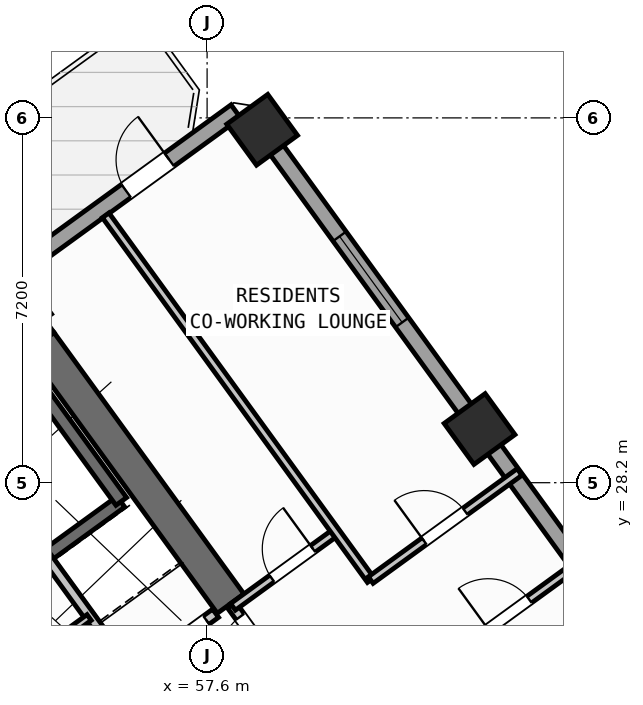
"""IFC4 building model, lengths in metres.
Left out: names, types, materials, properties, quantities, classifications, styles, units other than length and angle.
Written with IfcOpenShell. Run it as: python <this file> out.ifc"""

import sys

from ifc_helpers import new_model, si_unit, direction, frame, frame_2d, origin, origin_2d, place, context, subcontext, project, spatial, rectangle, hollow_rectangle, extrude, source, transform, mapped, element, fill, save


model = new_model("IFC4")
c1 = context("Model", 3, precision=1e-05, world=origin(), true_north=direction((0.0, 1.0)))
c2 = subcontext(c1, "Body", "Model", "MODEL_VIEW")
j1 = project(units=[si_unit("LENGTHUNIT", "METRE"), si_unit("PLANEANGLEUNIT", "RADIAN")], contexts=[c1])
p1 = place(None, origin())
s1 = spatial("IfcSite", under=j1, at=p1, CompositionType="ELEMENT")
p2 = place(p1, origin())
s2 = spatial("IfcBuilding", under=s1, at=p2, CompositionType="ELEMENT")
p3 = place(p2, frame((0.0, 0.0, 27.6)))
s3 = spatial("IfcBuildingStorey", under=s2, at=p3, CompositionType="ELEMENT", Elevation=27.6)
p4 = place(p3, frame((44.325, 24.113, 0.0), z_axis=(0.0, 0.0, 1.0), x_axis=(0.809012664862, 0.58779121131, 0.0)))
e1 = element("IfcWall", 1, at=p4, inside=s3, PredefinedType="SHEAR", context=c2, shape_type="SweptSolid", body=[
    extrude(rectangle(XDim=12.44, YDim=0.65, at=frame_2d((6.22, 0.0))), origin(), (0.0, 0.0, 1.0), 3.35),
])
p5 = place(p3, frame((58.064, 25.813, 0.0), z_axis=(0.0, 0.0, 1.0), x_axis=(-0.58777996584, 0.809020835181, 0.0)))
e2 = element("IfcWall", 2, at=p5, inside=s3, PredefinedType="SHEAR", context=c2, shape_type="SweptSolid", body=[
    extrude(rectangle(XDim=6.375, YDim=0.65, at=frame_2d((3.188, 0.0))), origin(), (0.0, 0.0, 1.0), 3.35),
])
m1 = source(origin(), c2, "Body", "SweptSolid", [
    extrude(hollow_rectangle(XDim=1.0, YDim=1.0, WallThickness=0.04, at=origin_2d()), origin(), (0.0, 0.0, 1.0), 3.6),
])
for number, where, z_axis, x_axis in (
    (3, (62.977, 29.259, 0.0), (0.0, 0.0, 1.0), (0.809, 0.588, 0.0)),
    (4, (58.686, 35.165, 0.0), (0.0, 0.0, 1.0), (0.809, 0.588, 0.0)),
):
    element("IfcColumn", number, at=place(p3, frame(where, z_axis=z_axis, x_axis=x_axis)), inside=s3, PredefinedType="COLUMN", context=c2, shape_type="MappedRepresentation", body=[
        mapped(m1, transform((0.0, 0.0, 0.0), scale=1.0)),
    ])
p6 = place(p3, frame((43.938, 25.192, 0.0), z_axis=(0.0, 0.0, 1.0), x_axis=(0.809016324578, 0.587786174187, 0.0)))
e5 = element("IfcWall", 5, at=p6, inside=s3, PredefinedType="STANDARD", context=c2, shape_type="SweptSolid", body=[
    extrude(rectangle(XDim=17.587, YDim=0.32, at=frame_2d((8.794, 0.0))), origin(), (0.0, 0.0, 1.0), 3.35),
])
p7 = place(p6, frame((14.914, 0.0, 0.0)))
e6 = element("IfcOpeningElement", 6, at=p7, cuts=e5, PredefinedType="OPENING", context=c2, shape_type="SweptSolid", body=[
    extrude(rectangle(XDim=1.05, YDim=2.15, at=frame_2d((0.525, 1.075))), frame((0.0, 0.17, 0.0), z_axis=(0.0, -1.0, 0.0), x_axis=(1.0, 0.0, 0.0)), (0.0, 0.0, 1.0), 0.34),
])
p8 = place(p6, frame((2.169, 0.0, 0.8)))
e7 = element("IfcOpeningElement", 7, at=p8, cuts=e5, PredefinedType="OPENING", context=c2, shape_type="SweptSolid", body=[
    extrude(rectangle(XDim=2.1, YDim=1.55, at=frame_2d((1.05, 0.775))), frame((0.0, 0.17, 0.0), z_axis=(0.0, -1.0, 0.0), x_axis=(1.0, 0.0, 0.0)), (0.0, 0.0, 1.0), 0.34),
])
p9 = place(p6, frame((7.319, 0.0, 0.8)))
e8 = element("IfcOpeningElement", 8, at=p9, cuts=e5, PredefinedType="OPENING", context=c2, shape_type="SweptSolid", body=[
    extrude(rectangle(XDim=2.1, YDim=1.55, at=frame_2d((1.05, 0.775))), frame((0.0, 0.17, 0.0), z_axis=(0.0, -1.0, 0.0), x_axis=(1.0, 0.0, 0.0)), (0.0, 0.0, 1.0), 0.34),
])
p10 = place(p3, frame((58.455, 35.484, 0.0), z_axis=(0.0, 0.0, 1.0), x_axis=(0.587783625747, -0.809018176127, 0.0)))
e9 = element("IfcWall", 9, at=p10, inside=s3, PredefinedType="STANDARD", context=c2, shape_type="SweptSolid", body=[
    extrude(rectangle(XDim=21.587, YDim=0.32, at=frame_2d((10.794, 0.0))), origin(), (0.0, 0.0, 1.0), 2.725),
])
p11 = place(p10, frame((2.994, 0.0, 0.8)))
e10 = element("IfcOpeningElement", 10, at=p11, cuts=e9, PredefinedType="OPENING", context=c2, shape_type="SweptSolid", body=[
    extrude(rectangle(XDim=2.1, YDim=1.55, at=frame_2d((1.05, 0.775))), frame((0.0, 0.17, 0.0), z_axis=(0.0, -1.0, 0.0), x_axis=(1.0, 0.0, 0.0)), (0.0, 0.0, 1.0), 0.34),
])
p12 = place(p10, frame((11.934, 0.0, 0.85)))
e11 = element("IfcOpeningElement", 11, at=p12, cuts=e9, PredefinedType="OPENING", context=c2, shape_type="SweptSolid", body=[
    extrude(rectangle(XDim=1.8, YDim=1.5, at=frame_2d((0.9, 0.75))), frame((0.0, 0.17, 0.0), z_axis=(0.0, -1.0, 0.0), x_axis=(1.0, 0.0, 0.0)), (0.0, 0.0, 1.0), 0.34),
])
p13 = place(p10, frame((18.535, 0.0, 0.85)))
e12 = element("IfcOpeningElement", 12, at=p13, cuts=e9, PredefinedType="OPENING", context=c2, shape_type="SweptSolid", body=[
    extrude(rectangle(XDim=1.5, YDim=1.5, at=frame_2d((0.75, 0.75))), frame((0.0, 0.17, 0.0), z_axis=(0.0, -1.0, 0.0), x_axis=(1.0, 0.0, 0.0)), (0.0, 0.0, 1.0), 0.34),
])
p14 = place(p3, frame((49.863, 23.44, 0.0), z_axis=(0.0, 0.0, 1.0), x_axis=(0.809003474932, 0.587803859759, 0.0)))
e13 = element("IfcWall", 13, at=p14, inside=s3, PredefinedType="SHEAR", context=c2, shape_type="SweptSolid", body=[
    extrude(rectangle(XDim=7.46, YDim=0.26, at=frame_2d((3.73, 0.0))), origin(), (0.0, 0.0, 1.0), 3.35),
])
p15 = place(p14, frame((0.36, 0.0, 0.0)))
e14 = element("IfcOpeningElement", 14, at=p15, cuts=e13, PredefinedType="OPENING", context=c2, shape_type="SweptSolid", body=[
    extrude(rectangle(XDim=0.86, YDim=2.05, at=frame_2d((0.43, 1.025))), frame((0.0, 0.14, 0.0), z_axis=(0.0, -1.0, 0.0), x_axis=(1.0, 0.0, 0.0)), (0.0, 0.0, 1.0), 0.28),
])
p16 = place(p3, frame((55.906, 27.831, 0.0), z_axis=(0.0, 0.0, 1.0), x_axis=(-0.587804123638, 0.809003283204, 0.0)))
e15 = element("IfcWall", 15, at=p16, inside=s3, PredefinedType="SHEAR", context=c2, shape_type="SweptSolid", body=[
    extrude(rectangle(XDim=3.16, YDim=0.26, at=frame_2d((1.58, 0.0))), origin(), (0.0, 0.0, 1.0), 3.35),
])
p17 = place(p3, frame((56.111, 24.419, 0.0), z_axis=(0.0, 0.0, 1.0), x_axis=(-0.58777848983, 0.809021907548, 0.0)))
e16 = element("IfcWall", 16, at=p17, inside=s3, PredefinedType="STANDARD", context=c2, shape_type="SweptSolid", body=[
    extrude(rectangle(XDim=2.88, YDim=0.2, at=frame_2d((1.44, 0.0))), origin(), (0.0, 0.0, 1.0), 3.34),
])
p18 = place(p3, frame((53.425, 22.468, 0.0), z_axis=(0.0, 0.0, 1.0), x_axis=(0.80902705128, 0.587771409902, 0.0)))
e17 = element("IfcWall", 17, at=p18, inside=s3, PredefinedType="STANDARD", context=c2, shape_type="SweptSolid", body=[
    extrude(rectangle(XDim=5.368, YDim=0.2, at=frame_2d((2.684, 0.0))), origin(), (0.0, 0.0, 1.0), 3.34),
])
p19 = place(p18, frame((4.28, 0.0, 0.0)))
e18 = element("IfcOpeningElement", 18, at=p19, cuts=e17, PredefinedType="OPENING", context=c2, shape_type="SweptSolid", body=[
    extrude(rectangle(XDim=0.86, YDim=2.05, at=frame_2d((0.43, 1.025))), frame((0.0, 0.11, 0.0), z_axis=(0.0, -1.0, 0.0), x_axis=(1.0, 0.0, 0.0)), (0.0, 0.0, 1.0), 0.22),
])
p20 = place(p18, frame((1.45, 0.0, 0.0)))
e19 = element("IfcOpeningElement", 19, at=p20, cuts=e17, PredefinedType="OPENING", context=c2, shape_type="SweptSolid", body=[
    extrude(rectangle(XDim=0.86, YDim=2.05, at=frame_2d((0.43, 1.025))), frame((0.0, 0.11, 0.0), z_axis=(0.0, -1.0, 0.0), x_axis=(1.0, 0.0, 0.0)), (0.0, 0.0, 1.0), 0.22),
])
p21 = place(p3, frame((52.618, 23.612, 0.0), z_axis=(0.0, 0.0, 1.0), x_axis=(0.809009587469, 0.587795446889, 0.0)))
e20 = element("IfcWall", 20, at=p21, inside=s3, PredefinedType="PLUMBINGWALL", context=c2, shape_type="SweptSolid", body=[
    extrude(rectangle(XDim=3.28, YDim=0.14, at=frame_2d((1.64, 0.0))), origin(), (0.0, 0.0, 1.0), 3.34),
])
p22 = place(p21, frame((1.2, 0.0, 0.0)))
e21 = element("IfcOpeningElement", 21, at=p22, cuts=e20, PredefinedType="OPENING", context=c2, shape_type="SweptSolid", body=[
    extrude(rectangle(XDim=0.78, YDim=2.05, at=frame_2d((0.39, 1.025))), frame((0.0, 0.08, 0.0), z_axis=(0.0, -1.0, 0.0), x_axis=(1.0, 0.0, 0.0)), (0.0, 0.0, 1.0), 0.16),
])
p23 = place(p3, frame((59.827, 23.386, 0.0), z_axis=(0.0, 0.0, 1.0), x_axis=(-0.587803840107, 0.809003489211, 0.0)))
e22 = element("IfcWall", 22, at=p23, inside=s3, PredefinedType="STANDARD", context=c2, shape_type="SweptSolid", body=[
    extrude(rectangle(XDim=2.96, YDim=0.2, at=frame_2d((1.48, 0.0))), origin(), (0.0, 0.0, 1.0), 3.34),
])
p24 = place(p23, frame((1.68, 0.0, 0.0)))
e23 = element("IfcOpeningElement", 23, at=p24, cuts=e22, PredefinedType="OPENING", context=c2, shape_type="SweptSolid", body=[
    extrude(rectangle(XDim=1.0, YDim=2.1, at=frame_2d((0.5, 1.05))), frame((0.0, 0.11, 0.0), z_axis=(0.0, -1.0, 0.0), x_axis=(1.0, 0.0, 0.0)), (0.0, 0.0, 1.0), 0.22),
])
p25 = place(p3, frame((58.111, 25.749, 0.0), z_axis=(0.0, 0.0, 1.0), x_axis=(0.809000999347, 0.58780726693, 0.0)))
e24 = element("IfcWall", 24, at=p25, inside=s3, PredefinedType="PARTITIONING", context=c2, shape_type="SweptSolid", body=[
    extrude(rectangle(XDim=2.51, YDim=0.16, at=frame_2d((1.255, 0.0))), origin(), (0.0, 0.0, 1.0), 2.725),
])
p26 = place(p25, frame((0.95, 0.0, 0.0)))
e25 = element("IfcOpeningElement", 25, at=p26, cuts=e24, PredefinedType="OPENING", context=c2, shape_type="SweptSolid", body=[
    extrude(rectangle(XDim=1.0, YDim=2.1, at=frame_2d((0.5, 1.05))), frame((0.0, 0.09, 0.0), z_axis=(0.0, -1.0, 0.0), x_axis=(1.0, 0.0, 0.0)), (0.0, 0.0, 1.0), 0.18),
])
p27 = place(p3, frame((60.829, 26.278, 0.0), z_axis=(0.0, 0.0, 1.0), x_axis=(-0.587781800813, 0.80901950201, 0.0)))
e26 = element("IfcWall", 26, at=p27, inside=s3, PredefinedType="PARTITIONING", context=c2, shape_type="SweptSolid", body=[
    extrude(rectangle(XDim=8.9, YDim=0.16, at=frame_2d((4.45, 0.0))), origin(), (0.0, 0.0, 1.0), 3.34),
])
p28 = place(p3, frame((62.093, 24.538, 0.0), z_axis=(0.0, 0.0, 1.0), x_axis=(0.809035546126, 0.58775971715, 0.0)))
e27 = element("IfcWall", 27, at=p28, inside=s3, PredefinedType="PARTITIONING", context=c2, shape_type="SweptSolid", body=[
    extrude(rectangle(XDim=3.63, YDim=0.16, at=frame_2d((1.815, 0.0))), origin(), (0.0, 0.0, 1.0), 3.34),
])
p29 = place(p28, frame((1.305, 0.0, 0.0)))
e28 = element("IfcOpeningElement", 28, at=p29, cuts=e27, PredefinedType="OPENING", context=c2, shape_type="SweptSolid", body=[
    extrude(rectangle(XDim=1.0, YDim=2.1, at=frame_2d((0.5, 1.05))), frame((0.0, 0.09, 0.0), z_axis=(0.0, -1.0, 0.0), x_axis=(1.0, 0.0, 0.0)), (0.0, 0.0, 1.0), 0.18),
])
p30 = place(p3, frame((60.829, 26.278, 0.0), z_axis=(0.0, 0.0, 1.0), x_axis=(0.809003564202, 0.587803736896, 0.0)))
e29 = element("IfcWall", 29, at=p30, inside=s3, PredefinedType="PARTITIONING", context=c2, shape_type="SweptSolid", body=[
    extrude(rectangle(XDim=3.63, YDim=0.16, at=frame_2d((1.815, 0.0))), origin(), (0.0, 0.0, 1.0), 3.34),
])
p31 = place(p30, frame((1.305, 0.0, 0.0)))
e30 = element("IfcOpeningElement", 30, at=p31, cuts=e29, PredefinedType="OPENING", context=c2, shape_type="SweptSolid", body=[
    extrude(rectangle(XDim=1.0, YDim=2.1, at=frame_2d((0.5, 1.05))), frame((0.0, 0.09, 0.0), z_axis=(0.0, -1.0, 0.0), x_axis=(1.0, 0.0, 0.0)), (0.0, 0.0, 1.0), 0.18),
])
m2 = source(origin(), c2, "Body", "SweptSolid", [
    extrude(rectangle(XDim=1.05, YDim=2.15, at=frame_2d((0.525, 1.075))), frame((0.0, 0.025, 0.0), z_axis=(0.0, -1.0, 0.0), x_axis=(1.0, 0.0, 0.0)), (0.0, 0.0, 1.0), 0.05),
])
p32 = place(p7, origin())
e31 = element("IfcDoor", 31, at=p32, inside=s3, OperationType="SINGLE_SWING_RIGHT", PredefinedType="DOOR", context=c2, shape_type="MappedRepresentation", body=[
    mapped(m2, transform((0.0, 0.0, 0.0), scale=1.0)),
])
fill(e6, e31)
m3 = source(origin(), c2, "Body", "SweptSolid", [
    extrude(rectangle(XDim=2.1, YDim=1.55, at=frame_2d((1.05, 0.775))), frame((0.0, 0.03, 0.0), z_axis=(0.0, -1.0, 0.0), x_axis=(1.0, 0.0, 0.0)), (0.0, 0.0, 1.0), 0.06),
])
p33 = place(p11, origin())
e32 = element("IfcWindow", 32, at=p33, inside=s3, PartitioningType="SINGLE_PANEL", PredefinedType="WINDOW", context=c2, shape_type="MappedRepresentation", body=[
    mapped(m3, transform((0.0, 0.0, 0.0), scale=1.0)),
])
fill(e10, e32)
m4 = source(origin(), c2, "Body", "SweptSolid", [
    extrude(rectangle(XDim=0.86, YDim=2.05, at=frame_2d((0.43, 1.025))), frame((0.0, 0.025, 0.0), z_axis=(0.0, -1.0, 0.0), x_axis=(1.0, 0.0, 0.0)), (0.0, 0.0, 1.0), 0.05),
])
p34 = place(p19, frame((0.86, 0.0, 0.0), z_axis=(0.0, 0.0, 1.0), x_axis=(-1.0, 0.0, 0.0)))
e33 = element("IfcDoor", 33, at=p34, inside=s3, OperationType="SINGLE_SWING_LEFT", PredefinedType="DOOR", context=c2, shape_type="MappedRepresentation", body=[
    mapped(m4, transform((0.0, 0.0, 0.0), scale=1.0)),
])
fill(e18, e33)
m5 = source(origin(), c2, "Body", "SweptSolid", [
    extrude(rectangle(XDim=1.0, YDim=2.1, at=frame_2d((0.5, 1.05))), frame((0.0, 0.025, 0.0), z_axis=(0.0, -1.0, 0.0), x_axis=(1.0, 0.0, 0.0)), (0.0, 0.0, 1.0), 0.05),
])
p35 = place(p26, origin())
e34 = element("IfcDoor", 34, at=p35, inside=s3, OperationType="SINGLE_SWING_RIGHT", PredefinedType="DOOR", context=c2, shape_type="MappedRepresentation", body=[
    mapped(m5, transform((0.0, 0.0, 0.0), scale=1.0)),
])
fill(e25, e34)
p36 = place(p24, origin())
e35 = element("IfcDoor", 35, at=p36, inside=s3, OperationType="SINGLE_SWING_LEFT", PredefinedType="DOOR", context=c2, shape_type="MappedRepresentation", body=[
    mapped(m5, transform((0.0, 0.0, 0.0), scale=1.0)),
])
fill(e23, e35)
p37 = place(p31, origin())
e36 = element("IfcDoor", 36, at=p37, inside=s3, OperationType="SINGLE_SWING_LEFT", PredefinedType="DOOR", context=c2, shape_type="MappedRepresentation", body=[
    mapped(m5, transform((0.0, 0.0, 0.0), scale=1.0)),
])
fill(e30, e36)
p38 = place(p29, origin())
e37 = element("IfcDoor", 37, at=p38, inside=s3, OperationType="SINGLE_SWING_LEFT", PredefinedType="DOOR", context=c2, shape_type="MappedRepresentation", body=[
    mapped(m5, transform((0.0, 0.0, 0.0), scale=1.0)),
])
fill(e28, e37)
save(model, sys.argv[1])
